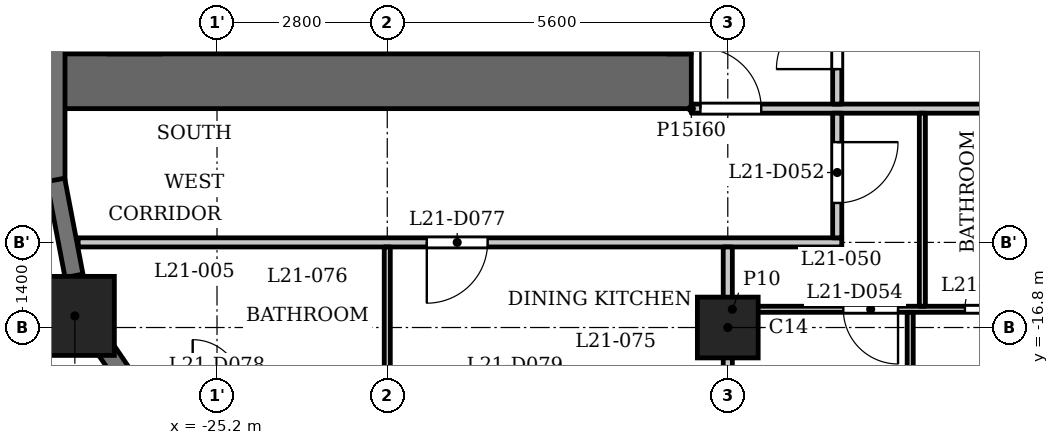
"""IFC4 building model, lengths in metres.
Left out: names, types, materials, properties, quantities, classifications, styles, units other than length and angle.
Written with IfcOpenShell. Run it as: python <this file> out.ifc"""

import sys

from ifc_helpers import new_model, si_unit, direction, frame, frame_2d, origin, origin_2d, place, context, subcontext, project, spatial, rectangle, extrude, element, fill, save


model = new_model("IFC4")
c1 = context("Model", 3, precision=1e-05, world=origin(), true_north=direction((0.0, 1.0)))
c2 = subcontext(c1, "Body", "Model", "MODEL_VIEW")
j1 = project(units=[si_unit("LENGTHUNIT", "METRE"), si_unit("PLANEANGLEUNIT", "RADIAN")], contexts=[c1])
p1 = place(None, origin())
s1 = spatial("IfcSite", under=j1, at=p1, CompositionType="ELEMENT")
p2 = place(p1, origin())
s2 = spatial("IfcBuilding", under=s1, at=p2, CompositionType="ELEMENT")
p3 = place(p2, frame((0.0, 0.0, 86.8)))
s3 = spatial("IfcBuildingStorey", under=s2, at=p3, CompositionType="ELEMENT", Elevation=86.8)
p4 = place(p3, frame((-27.538, -16.609, 0.0), z_axis=(0.0, 0.0, 1.0), x_axis=(1.0, 0.0, 0.0)))
e1 = element("IfcColumn", 1, at=p4, inside=s3, PredefinedType="COLUMN", context=c2, shape_type="SweptSolid", body=[
    extrude(rectangle(XDim=1.3, YDim=1.3, at=origin_2d()), origin(), (0.0, 0.0, 1.0), 3.5),
])
p5 = place(p3, frame((-16.8, -16.8, 0.0), z_axis=(0.0, 0.0, 1.0), x_axis=(1.0, 0.0, 0.0)))
e2 = element("IfcColumn", 2, at=p5, inside=s3, PredefinedType="COLUMN", context=c2, shape_type="SweptSolid", body=[
    extrude(rectangle(XDim=1.0, YDim=1.0, at=origin_2d()), origin(), (0.0, 0.0, 1.0), 3.5),
])
p6 = place(p3, frame((-27.85, -11.85, 0.0), z_axis=(0.0, 0.0, 1.0), x_axis=(0.0, -1.0, 0.0)))
e3 = element("IfcWall", 3, at=p6, inside=s3, PredefinedType="SOLIDWALL", context=c2, shape_type="SweptSolid", body=[
    extrude(rectangle(XDim=2.55, YDim=0.3, at=frame_2d((1.275, 0.0))), origin(), (0.0, 0.0, 1.0), 2.4),
])
for number, where, z_axis, x_axis in (
    (4, (-27.853, -14.372, 0.0), (0.0, 0.0, 1.0), (0.187, -0.982, 0.0)),
    (5, (-27.082, -17.084, 0.0), (0.0, 0.0, 1.0), (0.562, -0.827, 0.0)),
):
    element("IfcWall", number, at=place(p3, frame(where, z_axis=z_axis, x_axis=x_axis)), inside=s3, PredefinedType="SOLIDWALL", context=c2, shape_type="SweptSolid", body=[
        extrude(rectangle(XDim=1.606, YDim=0.3, at=frame_2d((0.803, 0.0))), origin(), (0.0, 0.0, 1.0), 2.4),
    ])
p7 = place(p3, frame((-17.4, -12.75, 0.0), z_axis=(0.0, 0.0, 1.0), x_axis=(-1.0, 0.0, 0.0)))
e6 = element("IfcWall", 6, at=p7, inside=s3, PredefinedType="SHEAR", context=c2, shape_type="SweptSolid", body=[
    extrude(rectangle(XDim=10.4, YDim=0.9, at=frame_2d((5.2, 0.0))), origin(), (0.0, 0.0, 1.0), 3.2),
])
p8 = place(p3, frame((-17.6, -12.3, 0.0), z_axis=(0.0, 0.0, 1.0), x_axis=(0.0, 1.0, 0.0)))
e7 = element("IfcWall", 7, at=p8, inside=s3, PredefinedType="SHEAR", context=c2, shape_type="SweptSolid", body=[
    extrude(rectangle(XDim=24.6, YDim=0.4, at=frame_2d((12.3, 0.0))), origin(), (0.0, 0.0, 1.0), 3.2),
])
p9 = place(p8, frame((6.0, 0.0, 0.0)))
e8 = element("IfcOpeningElement", 8, at=p9, cuts=e7, PredefinedType="OPENING", context=c2, shape_type="SweptSolid", body=[
    extrude(rectangle(XDim=1.1, YDim=2.1, at=frame_2d((0.55, 1.05))), frame((0.0, 0.21, 0.0), z_axis=(0.0, -1.0, 0.0), x_axis=(1.0, 0.0, 0.0)), (0.0, 0.0, 1.0), 0.42),
])
p10 = place(p8, frame((8.4, 0.0, 0.0)))
e9 = element("IfcOpeningElement", 9, at=p10, cuts=e7, PredefinedType="OPENING", context=c2, shape_type="SweptSolid", body=[
    extrude(rectangle(XDim=1.1, YDim=2.1, at=frame_2d((0.55, 1.05))), frame((0.0, 0.21, 0.0), z_axis=(0.0, -1.0, 0.0), x_axis=(1.0, 0.0, 0.0)), (0.0, 0.0, 1.0), 0.42),
])
p11 = place(p8, frame((10.8, 0.0, 0.0)))
e10 = element("IfcOpeningElement", 10, at=p11, cuts=e7, PredefinedType="OPENING", context=c2, shape_type="SweptSolid", body=[
    extrude(rectangle(XDim=1.1, YDim=2.1, at=frame_2d((0.55, 1.05))), frame((0.0, 0.21, 0.0), z_axis=(0.0, -1.0, 0.0), x_axis=(1.0, 0.0, 0.0)), (0.0, 0.0, 1.0), 0.42),
])
p12 = place(p8, frame((16.75, 0.0, 0.0)))
e11 = element("IfcOpeningElement", 11, at=p12, cuts=e7, PredefinedType="OPENING", context=c2, shape_type="SweptSolid", body=[
    extrude(rectangle(XDim=0.9, YDim=2.1, at=frame_2d((0.45, 1.05))), frame((0.0, 0.21, 0.0), z_axis=(0.0, -1.0, 0.0), x_axis=(1.0, 0.0, 0.0)), (0.0, 0.0, 1.0), 0.42),
])
p13 = place(p8, frame((22.8, 0.0, 0.0)))
e12 = element("IfcOpeningElement", 12, at=p13, cuts=e7, PredefinedType="OPENING", context=c2, shape_type="SweptSolid", body=[
    extrude(rectangle(XDim=1.1, YDim=2.1, at=frame_2d((0.55, 1.05))), frame((0.0, 0.21, 0.0), z_axis=(0.0, -1.0, 0.0), x_axis=(1.0, 0.0, 0.0)), (0.0, 0.0, 1.0), 0.42),
])
p14 = place(p8, frame((0.7, 0.0, 0.0)))
e13 = element("IfcOpeningElement", 13, at=p14, cuts=e7, PredefinedType="OPENING", context=c2, shape_type="SweptSolid", body=[
    extrude(rectangle(XDim=1.1, YDim=2.1, at=frame_2d((0.55, 1.05))), frame((0.0, 0.21, 0.0), z_axis=(0.0, -1.0, 0.0), x_axis=(1.0, 0.0, 0.0)), (0.0, 0.0, 1.0), 0.42),
])
p15 = place(p8, frame((12.775, 0.0, 0.0)))
e14 = element("IfcOpeningElement", 14, at=p15, cuts=e7, PredefinedType="OPENING", context=c2, shape_type="SweptSolid", body=[
    extrude(rectangle(XDim=1.8, YDim=2.1, at=frame_2d((0.9, 1.05))), frame((0.0, 0.21, 0.0), z_axis=(0.0, -1.0, 0.0), x_axis=(1.0, 0.0, 0.0)), (0.0, 0.0, 1.0), 0.42),
])
p16 = place(p3, frame((-26.55, -12.3, 0.0), z_axis=(0.0, 0.0, 1.0), x_axis=(0.0, 1.0, 0.0)))
e15 = element("IfcWall", 15, at=p16, inside=s3, PredefinedType="SHEAR", context=c2, shape_type="SweptSolid", body=[
    extrude(rectangle(XDim=24.6, YDim=0.9, at=frame_2d((12.3, 0.0))), origin(), (0.0, 0.0, 1.0), 3.2),
])
p17 = place(p3, frame((-23.55, -12.3, 0.0), z_axis=(0.0, 0.0, 1.0), x_axis=(0.0, 1.0, 0.0)))
e16 = element("IfcWall", 16, at=p17, inside=s3, PredefinedType="PARTITIONING", context=c2, shape_type="SweptSolid", body=[
    extrude(rectangle(XDim=2.5, YDim=0.2, at=frame_2d((1.25, 0.0))), origin(), (0.0, 0.0, 1.0), 3.2),
])
p18 = place(p17, frame((0.8, 0.0, 0.0)))
e17 = element("IfcOpeningElement", 17, at=p18, cuts=e16, PredefinedType="OPENING", context=c2, shape_type="SweptSolid", body=[
    extrude(rectangle(XDim=0.9, YDim=2.1, at=frame_2d((0.45, 1.05))), frame((0.0, 0.11, 0.0), z_axis=(0.0, -1.0, 0.0), x_axis=(1.0, 0.0, 0.0)), (0.0, 0.0, 1.0), 0.22),
])
p19 = place(p3, frame((-16.725, -16.5, 0.0), z_axis=(0.0, 0.0, 1.0), x_axis=(1.0, 0.0, 0.0)))
e18 = element("IfcWall", 18, at=p19, inside=s3, PredefinedType="PARTITIONING", context=c2, shape_type="SweptSolid", body=[
    extrude(rectangle(XDim=33.45, YDim=0.1, at=frame_2d((16.725, 0.0))), origin(), (0.0, 0.0, 1.0), 3.2),
])
p20 = place(p19, frame((3.825, 0.0, 0.0)))
e19 = element("IfcOpeningElement", 19, at=p20, cuts=e18, PredefinedType="OPENING", context=c2, shape_type="SweptSolid", body=[
    extrude(rectangle(XDim=0.8, YDim=2.1, at=frame_2d((0.4, 1.05))), frame((0.0, 0.06, 0.0), z_axis=(0.0, -1.0, 0.0), x_axis=(1.0, 0.0, 0.0)), (0.0, 0.0, 1.0), 0.12),
])
p21 = place(p19, frame((1.825, 0.0, 0.0)))
e20 = element("IfcOpeningElement", 20, at=p21, cuts=e18, PredefinedType="OPENING", context=c2, shape_type="SweptSolid", body=[
    extrude(rectangle(XDim=0.9, YDim=2.1, at=frame_2d((0.45, 1.05))), frame((0.0, 0.06, 0.0), z_axis=(0.0, -1.0, 0.0), x_axis=(1.0, 0.0, 0.0)), (0.0, 0.0, 1.0), 0.12),
])
p22 = place(p19, frame((9.675, 0.0, 0.0)))
e21 = element("IfcOpeningElement", 21, at=p22, cuts=e18, PredefinedType="OPENING", context=c2, shape_type="SweptSolid", body=[
    extrude(rectangle(XDim=0.8, YDim=2.1, at=frame_2d((0.4, 1.05))), frame((0.0, 0.06, 0.0), z_axis=(0.0, -1.0, 0.0), x_axis=(1.0, 0.0, 0.0)), (0.0, 0.0, 1.0), 0.12),
])
p23 = place(p19, frame((6.425, 0.0, 0.0)))
e22 = element("IfcOpeningElement", 22, at=p23, cuts=e18, PredefinedType="OPENING", context=c2, shape_type="SweptSolid", body=[
    extrude(rectangle(XDim=0.9, YDim=2.1, at=frame_2d((0.45, 1.05))), frame((0.0, 0.06, 0.0), z_axis=(0.0, -1.0, 0.0), x_axis=(1.0, 0.0, 0.0)), (0.0, 0.0, 1.0), 0.12),
])
p24 = place(p19, frame((15.275, 0.0, 0.0)))
e23 = element("IfcOpeningElement", 23, at=p24, cuts=e18, PredefinedType="OPENING", context=c2, shape_type="SweptSolid", body=[
    extrude(rectangle(XDim=0.8, YDim=2.1, at=frame_2d((0.4, 1.05))), frame((0.0, 0.06, 0.0), z_axis=(0.0, -1.0, 0.0), x_axis=(1.0, 0.0, 0.0)), (0.0, 0.0, 1.0), 0.12),
])
p25 = place(p19, frame((12.025, 0.0, 0.0)))
e24 = element("IfcOpeningElement", 24, at=p25, cuts=e18, PredefinedType="OPENING", context=c2, shape_type="SweptSolid", body=[
    extrude(rectangle(XDim=0.9, YDim=2.1, at=frame_2d((0.45, 1.05))), frame((0.0, 0.06, 0.0), z_axis=(0.0, -1.0, 0.0), x_axis=(1.0, 0.0, 0.0)), (0.0, 0.0, 1.0), 0.12),
])
p26 = place(p19, frame((20.875, 0.0, 0.0)))
e25 = element("IfcOpeningElement", 25, at=p26, cuts=e18, PredefinedType="OPENING", context=c2, shape_type="SweptSolid", body=[
    extrude(rectangle(XDim=0.8, YDim=2.1, at=frame_2d((0.4, 1.05))), frame((0.0, 0.06, 0.0), z_axis=(0.0, -1.0, 0.0), x_axis=(1.0, 0.0, 0.0)), (0.0, 0.0, 1.0), 0.12),
])
p27 = place(p19, frame((18.625, 0.0, 0.0)))
e26 = element("IfcOpeningElement", 26, at=p27, cuts=e18, PredefinedType="OPENING", context=c2, shape_type="SweptSolid", body=[
    extrude(rectangle(XDim=0.9, YDim=2.1, at=frame_2d((0.45, 1.05))), frame((0.0, 0.06, 0.0), z_axis=(0.0, -1.0, 0.0), x_axis=(1.0, 0.0, 0.0)), (0.0, 0.0, 1.0), 0.12),
])
p28 = place(p19, frame((23.875, 0.0, 0.0)))
e27 = element("IfcOpeningElement", 27, at=p28, cuts=e18, PredefinedType="OPENING", context=c2, shape_type="SweptSolid", body=[
    extrude(rectangle(XDim=0.8, YDim=2.1, at=frame_2d((0.4, 1.05))), frame((0.0, 0.06, 0.0), z_axis=(0.0, -1.0, 0.0), x_axis=(1.0, 0.0, 0.0)), (0.0, 0.0, 1.0), 0.12),
])
p29 = place(p19, frame((26.225, 0.0, 0.0)))
e28 = element("IfcOpeningElement", 28, at=p29, cuts=e18, PredefinedType="OPENING", context=c2, shape_type="SweptSolid", body=[
    extrude(rectangle(XDim=0.9, YDim=2.1, at=frame_2d((0.45, 1.05))), frame((0.0, 0.06, 0.0), z_axis=(0.0, -1.0, 0.0), x_axis=(1.0, 0.0, 0.0)), (0.0, 0.0, 1.0), 0.12),
])
p30 = place(p19, frame((28.575, 0.0, 0.0)))
e29 = element("IfcOpeningElement", 29, at=p30, cuts=e18, PredefinedType="OPENING", context=c2, shape_type="SweptSolid", body=[
    extrude(rectangle(XDim=0.9, YDim=2.1, at=frame_2d((0.45, 1.05))), frame((0.0, 0.06, 0.0), z_axis=(0.0, -1.0, 0.0), x_axis=(1.0, 0.0, 0.0)), (0.0, 0.0, 1.0), 0.12),
])
p31 = place(p19, frame((30.675, 0.0, 0.0)))
e30 = element("IfcOpeningElement", 30, at=p31, cuts=e18, PredefinedType="OPENING", context=c2, shape_type="SweptSolid", body=[
    extrude(rectangle(XDim=0.9, YDim=2.1, at=frame_2d((0.45, 1.05))), frame((0.0, 0.06, 0.0), z_axis=(0.0, -1.0, 0.0), x_axis=(1.0, 0.0, 0.0)), (0.0, 0.0, 1.0), 0.12),
])
p32 = place(p3, frame((-27.484, -15.4, 0.0), z_axis=(0.0, 0.0, 1.0), x_axis=(1.0, 0.0, 0.0)))
e31 = element("IfcWall", 31, at=p32, inside=s3, PredefinedType="PARTITIONING", context=c2, shape_type="SweptSolid", body=[
    extrude(rectangle(XDim=12.559, YDim=0.15, at=frame_2d((6.279, 0.0))), origin(), (0.0, 0.0, 1.0), 3.2),
])
p33 = place(p32, frame((5.734, 0.0, 0.0)))
e32 = element("IfcOpeningElement", 32, at=p33, cuts=e31, PredefinedType="OPENING", context=c2, shape_type="SweptSolid", body=[
    extrude(rectangle(XDim=1.0, YDim=2.1, at=frame_2d((0.5, 1.05))), frame((0.0, 0.085, 0.0), z_axis=(0.0, -1.0, 0.0), x_axis=(1.0, 0.0, 0.0)), (0.0, 0.0, 1.0), 0.17),
])
p34 = place(p3, frame((-17.4, -13.2, 0.0), z_axis=(0.0, 0.0, 1.0), x_axis=(1.0, 0.0, 0.0)))
e33 = element("IfcWall", 33, at=p34, inside=s3, PredefinedType="PARTITIONING", context=c2, shape_type="SweptSolid", body=[
    extrude(rectangle(XDim=34.8, YDim=0.15, at=frame_2d((17.4, 0.0))), origin(), (0.0, 0.0, 1.0), 3.2),
])
p35 = place(p34, frame((0.15, 0.0, 0.0)))
e34 = element("IfcOpeningElement", 34, at=p35, cuts=e33, PredefinedType="OPENING", context=c2, shape_type="SweptSolid", body=[
    extrude(rectangle(XDim=1.0, YDim=2.1, at=frame_2d((0.5, 1.05))), frame((0.0, 0.085, 0.0), z_axis=(0.0, -1.0, 0.0), x_axis=(1.0, 0.0, 0.0)), (0.0, 0.0, 1.0), 0.17),
])
p36 = place(p34, frame((33.55, 0.0, 0.0)))
e35 = element("IfcOpeningElement", 35, at=p36, cuts=e33, PredefinedType="OPENING", context=c2, shape_type="SweptSolid", body=[
    extrude(rectangle(XDim=1.0, YDim=2.1, at=frame_2d((0.5, 1.05))), frame((0.0, 0.085, 0.0), z_axis=(0.0, -1.0, 0.0), x_axis=(1.0, 0.0, 0.0)), (0.0, 0.0, 1.0), 0.17),
])
p37 = place(p34, frame((7.35, 0.0, 0.0)))
e36 = element("IfcOpeningElement", 36, at=p37, cuts=e33, PredefinedType="OPENING", context=c2, shape_type="SweptSolid", body=[
    extrude(rectangle(XDim=1.0, YDim=2.1, at=frame_2d((0.5, 1.05))), frame((0.0, 0.085, 0.0), z_axis=(0.0, -1.0, 0.0), x_axis=(1.0, 0.0, 0.0)), (0.0, 0.0, 1.0), 0.17),
])
p38 = place(p34, frame((13.7, 0.0, 0.0)))
e37 = element("IfcOpeningElement", 37, at=p38, cuts=e33, PredefinedType="OPENING", context=c2, shape_type="SweptSolid", body=[
    extrude(rectangle(XDim=1.0, YDim=2.1, at=frame_2d((0.5, 1.05))), frame((0.0, 0.085, 0.0), z_axis=(0.0, -1.0, 0.0), x_axis=(1.0, 0.0, 0.0)), (0.0, 0.0, 1.0), 0.17),
])
p39 = place(p34, frame((19.3, 0.0, 0.0)))
e38 = element("IfcOpeningElement", 38, at=p39, cuts=e33, PredefinedType="OPENING", context=c2, shape_type="SweptSolid", body=[
    extrude(rectangle(XDim=1.0, YDim=2.1, at=frame_2d((0.5, 1.05))), frame((0.0, 0.085, 0.0), z_axis=(0.0, -1.0, 0.0), x_axis=(1.0, 0.0, 0.0)), (0.0, 0.0, 1.0), 0.17),
])
p40 = place(p3, frame((-22.4, -17.75, 0.0), z_axis=(0.0, 0.0, 1.0), x_axis=(0.0, 1.0, 0.0)))
e39 = element("IfcWall", 39, at=p40, inside=s3, PredefinedType="PARTITIONING", context=c2, shape_type="SweptSolid", body=[
    extrude(rectangle(XDim=2.275, YDim=0.1, at=frame_2d((1.137, 0.0))), origin(), (0.0, 0.0, 1.0), 3.2),
])
p41 = place(p3, frame((-16.8, -23.03, 0.0), z_axis=(0.0, 0.0, 1.0), x_axis=(0.0, 1.0, 0.0)))
e40 = element("IfcWall", 40, at=p41, inside=s3, PredefinedType="PARTITIONING", context=c2, shape_type="SweptSolid", body=[
    extrude(rectangle(XDim=7.555, YDim=0.15, at=frame_2d((3.777, 0.0))), origin(), (0.0, 0.0, 1.0), 3.2),
])
p42 = place(p3, frame((-15.0, -15.325, 0.0), z_axis=(0.0, 0.0, 1.0), x_axis=(0.0, 1.0, 0.0)))
e41 = element("IfcWall", 41, at=p42, inside=s3, PredefinedType="PARTITIONING", context=c2, shape_type="SweptSolid", body=[
    extrude(rectangle(XDim=2.05, YDim=0.15, at=frame_2d((1.025, 0.0))), origin(), (0.0, 0.0, 1.0), 3.2),
])
p43 = place(p42, frame((0.574, 0.0, 0.0)))
e42 = element("IfcOpeningElement", 42, at=p43, cuts=e41, PredefinedType="OPENING", context=c2, shape_type="SweptSolid", body=[
    extrude(rectangle(XDim=1.0, YDim=2.1, at=frame_2d((0.5, 1.05))), frame((0.0, 0.085, 0.0), z_axis=(0.0, -1.0, 0.0), x_axis=(1.0, 0.0, 0.0)), (0.0, 0.0, 1.0), 0.17),
])
p44 = place(p3, frame((-15.0, -13.125, 0.0), z_axis=(0.0, 0.0, 1.0), x_axis=(0.0, 1.0, 0.0)))
e43 = element("IfcWall", 43, at=p44, inside=s3, PredefinedType="PARTITIONING", context=c2, shape_type="SweptSolid", body=[
    extrude(rectangle(XDim=6.356, YDim=0.15, at=frame_2d((3.178, 0.0))), origin(), (0.0, 0.0, 1.0), 3.2),
])
p45 = place(p44, frame((0.575, 0.0, 0.0)))
e44 = element("IfcOpeningElement", 44, at=p45, cuts=e43, PredefinedType="OPENING", context=c2, shape_type="SweptSolid", body=[
    extrude(rectangle(XDim=1.0, YDim=2.1, at=frame_2d((0.5, 1.05))), frame((0.0, 0.085, 0.0), z_axis=(0.0, -1.0, 0.0), x_axis=(1.0, 0.0, 0.0)), (0.0, 0.0, 1.0), 0.17),
])
p46 = place(p3, frame((-13.8, -22.08, 0.0), z_axis=(0.0, 0.0, 1.0), x_axis=(0.0, 1.0, 0.0)))
e45 = element("IfcWall", 45, at=p46, inside=s3, PredefinedType="PARTITIONING", context=c2, shape_type="SweptSolid", body=[
    extrude(rectangle(XDim=5.53, YDim=0.1, at=frame_2d((2.765, 0.0))), origin(), (0.0, 0.0, 1.0), 3.2),
])
p47 = place(p46, frame((0.42, 0.0, 0.0)))
e46 = element("IfcOpeningElement", 46, at=p47, cuts=e45, PredefinedType="OPENING", context=c2, shape_type="SweptSolid", body=[
    extrude(rectangle(XDim=0.9, YDim=2.1, at=frame_2d((0.45, 1.05))), frame((0.0, 0.06, 0.0), z_axis=(0.0, -1.0, 0.0), x_axis=(1.0, 0.0, 0.0)), (0.0, 0.0, 1.0), 0.12),
])
p48 = place(p3, frame((-13.6, -16.45, 0.0), z_axis=(0.0, 0.0, 1.0), x_axis=(0.0, 1.0, 0.0)))
e47 = element("IfcWall", 47, at=p48, inside=s3, PredefinedType="PARTITIONING", context=c2, shape_type="SweptSolid", body=[
    extrude(rectangle(XDim=3.175, YDim=0.1, at=frame_2d((1.587, 0.0))), origin(), (0.0, 0.0, 1.0), 3.2),
])
p49 = place(p45, origin())
e48 = element("IfcDoor", 48, at=p49, inside=s3, OperationType="SINGLE_SWING_RIGHT", PredefinedType="DOOR", context=c2, shape_type="SweptSolid", body=[
    extrude(rectangle(XDim=1.0, YDim=2.1, at=frame_2d((0.5, 1.05))), frame((0.0, 0.025, 0.0), z_axis=(0.0, -1.0, 0.0), x_axis=(1.0, 0.0, 0.0)), (0.0, 0.0, 1.0), 0.05),
])
fill(e44, e48)
p50 = place(p35, origin())
e49 = element("IfcDoor", 49, at=p50, inside=s3, OperationType="SINGLE_SWING_RIGHT", PredefinedType="DOOR", context=c2, shape_type="SweptSolid", body=[
    extrude(rectangle(XDim=1.0, YDim=2.1, at=frame_2d((0.5, 1.05))), frame((0.0, 0.025, 0.0), z_axis=(0.0, -1.0, 0.0), x_axis=(1.0, 0.0, 0.0)), (0.0, 0.0, 1.0), 0.05),
])
fill(e34, e49)
p51 = place(p43, origin())
e50 = element("IfcDoor", 50, at=p51, inside=s3, OperationType="SINGLE_SWING_RIGHT", PredefinedType="DOOR", context=c2, shape_type="SweptSolid", body=[
    extrude(rectangle(XDim=1.0, YDim=2.1, at=frame_2d((0.5, 1.05))), frame((0.0, 0.025, 0.0), z_axis=(0.0, -1.0, 0.0), x_axis=(1.0, 0.0, 0.0)), (0.0, 0.0, 1.0), 0.05),
])
fill(e42, e50)
p52 = place(p20, origin())
e51 = element("IfcDoor", 51, at=p52, inside=s3, OperationType="SINGLE_SWING_LEFT", PredefinedType="DOOR", context=c2, shape_type="SweptSolid", body=[
    extrude(rectangle(XDim=0.8, YDim=2.1, at=frame_2d((0.4, 1.05))), frame((0.0, 0.025, 0.0), z_axis=(0.0, -1.0, 0.0), x_axis=(1.0, 0.0, 0.0)), (0.0, 0.0, 1.0), 0.05),
])
fill(e19, e51)
p53 = place(p21, origin())
e52 = element("IfcDoor", 52, at=p53, inside=s3, OperationType="SINGLE_SWING_RIGHT", PredefinedType="DOOR", context=c2, shape_type="SweptSolid", body=[
    extrude(rectangle(XDim=0.9, YDim=2.1, at=frame_2d((0.45, 1.05))), frame((0.0, 0.025, 0.0), z_axis=(0.0, -1.0, 0.0), x_axis=(1.0, 0.0, 0.0)), (0.0, 0.0, 1.0), 0.05),
])
fill(e20, e52)
p54 = place(p33, origin())
e53 = element("IfcDoor", 53, at=p54, inside=s3, OperationType="SINGLE_SWING_LEFT", PredefinedType="DOOR", context=c2, shape_type="SweptSolid", body=[
    extrude(rectangle(XDim=1.0, YDim=2.1, at=frame_2d((0.5, 1.05))), frame((0.0, 0.025, 0.0), z_axis=(0.0, -1.0, 0.0), x_axis=(1.0, 0.0, 0.0)), (0.0, 0.0, 1.0), 0.05),
])
fill(e32, e53)
save(model, sys.argv[1])
